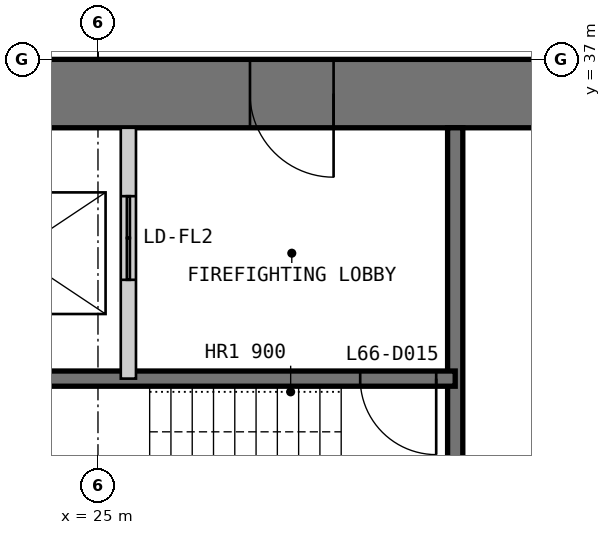
"""IFC4 building model, lengths in metres.
Left out: names, types, materials, properties, quantities, classifications, styles, units other than length and angle.
Written with IfcOpenShell. Run it as: python <this file> out.ifc"""

import sys

from ifc_helpers import new_model, si_unit, direction, frame, frame_2d, origin, place, context, subcontext, project, spatial, polyline, rectangle, outline, extrude, element, fill, save


model = new_model("IFC4")
c1 = context("Model", 3, precision=1e-05, world=origin(), true_north=direction((0.0, 1.0)))
c2 = subcontext(c1, "Body", "Model", "MODEL_VIEW")
j1 = project(units=[si_unit("LENGTHUNIT", "METRE"), si_unit("PLANEANGLEUNIT", "RADIAN")], contexts=[c1])
p1 = place(None, origin())
s1 = spatial("IfcSite", under=j1, at=p1, CompositionType="ELEMENT")
p2 = place(p1, origin())
s2 = spatial("IfcBuilding", under=s1, at=p2, CompositionType="ELEMENT")
p3 = place(p2, frame((0.0, 0.0, 276.4)))
s3 = spatial("IfcBuildingStorey", under=s2, at=p3, CompositionType="ELEMENT", Elevation=276.4)
p4 = place(p3, frame((37.0, 36.55, 0.0), z_axis=(0.0, 0.0, 1.0), x_axis=(-1.0, 0.0, 0.0)))
e1 = element("IfcWall", 1, at=p4, inside=s3, PredefinedType="SHEAR", context=c2, shape_type="SweptSolid", body=[
    extrude(outline(polyline([(0.0, -0.45), (24.0, -0.45), (23.1, 0.45), (0.9, 0.45), (0.0, -0.45)])), origin(), (0.0, 0.0, 1.0), 3.4),
])
p5 = place(p4, frame((4.9, 0.0, 0.0)))
e2 = element("IfcOpeningElement", 2, at=p5, cuts=e1, PredefinedType="OPENING", context=c2, shape_type="SweptSolid", body=[
    extrude(rectangle(XDim=1.0, YDim=2.2, at=frame_2d((0.5, 1.1))), frame((0.0, 0.46, 0.0), z_axis=(0.0, -1.0, 0.0), x_axis=(1.0, 0.0, 0.0)), (0.0, 0.0, 1.0), 0.92),
])
p6 = place(p4, frame((8.9, 0.0, 0.0)))
e3 = element("IfcOpeningElement", 3, at=p6, cuts=e1, PredefinedType="OPENING", context=c2, shape_type="SweptSolid", body=[
    extrude(rectangle(XDim=1.1, YDim=2.2, at=frame_2d((0.55, 1.1))), frame((0.0, 0.46, 0.0), z_axis=(0.0, -1.0, 0.0), x_axis=(1.0, 0.0, 0.0)), (0.0, 0.0, 1.0), 0.92),
])
p7 = place(p4, frame((15.05, 0.0, 0.0)))
e4 = element("IfcOpeningElement", 4, at=p7, cuts=e1, PredefinedType="OPENING", context=c2, shape_type="SweptSolid", body=[
    extrude(rectangle(XDim=0.9, YDim=2.2, at=frame_2d((0.45, 1.1))), frame((0.0, 0.46, 0.0), z_axis=(0.0, -1.0, 0.0), x_axis=(1.0, 0.0, 0.0)), (0.0, 0.0, 1.0), 0.92),
])
p8 = place(p4, frame((17.9, 0.0, 0.0)))
e5 = element("IfcOpeningElement", 5, at=p8, cuts=e1, PredefinedType="OPENING", context=c2, shape_type="SweptSolid", body=[
    extrude(rectangle(XDim=1.0, YDim=2.2, at=frame_2d((0.5, 1.1))), frame((0.0, 0.46, 0.0), z_axis=(0.0, -1.0, 0.0), x_axis=(1.0, 0.0, 0.0)), (0.0, 0.0, 1.0), 0.92),
])
p9 = place(p4, frame((21.4, 0.0, 0.0)))
e6 = element("IfcOpeningElement", 6, at=p9, cuts=e1, PredefinedType="OPENING", context=c2, shape_type="SweptSolid", body=[
    extrude(rectangle(XDim=1.0, YDim=2.2, at=frame_2d((0.5, 1.1))), frame((0.0, 0.46, 0.0), z_axis=(0.0, -1.0, 0.0), x_axis=(1.0, 0.0, 0.0)), (0.0, 0.0, 1.0), 0.92),
])
p10 = place(p3, frame((29.7, 36.1, 0.0), z_axis=(0.0, 0.0, 1.0), x_axis=(0.0, -1.0, 0.0)))
e7 = element("IfcWall", 7, at=p10, inside=s3, PredefinedType="SOLIDWALL", context=c2, shape_type="SweptSolid", body=[
    extrude(rectangle(XDim=16.1, YDim=0.2, at=frame_2d((8.05, 0.0))), origin(), (0.0, 0.0, 1.0), 3.2),
])
p11 = place(p10, frame((6.4, 0.0, 0.0)))
e8 = element("IfcOpeningElement", 8, at=p11, cuts=e7, PredefinedType="OPENING", context=c2, shape_type="SweptSolid", body=[
    extrude(rectangle(XDim=0.9, YDim=2.2, at=frame_2d((0.45, 1.1))), frame((0.0, 0.11, 0.0), z_axis=(0.0, -1.0, 0.0), x_axis=(1.0, 0.0, 0.0)), (0.0, 0.0, 1.0), 0.22),
])
p12 = place(p10, frame((11.4, 0.0, 0.0)))
e9 = element("IfcOpeningElement", 9, at=p12, cuts=e7, PredefinedType="OPENING", context=c2, shape_type="SweptSolid", body=[
    extrude(rectangle(XDim=0.9, YDim=2.2, at=frame_2d((0.45, 1.1))), frame((0.0, 0.11, 0.0), z_axis=(0.0, -1.0, 0.0), x_axis=(1.0, 0.0, 0.0)), (0.0, 0.0, 1.0), 0.22),
])
p13 = place(p3, frame((29.7, 32.8, 0.0), z_axis=(0.0, 0.0, 1.0), x_axis=(-1.0, 0.0, 0.0)))
e10 = element("IfcWall", 10, at=p13, inside=s3, PredefinedType="SOLIDWALL", context=c2, shape_type="SweptSolid", body=[
    extrude(rectangle(XDim=9.4, YDim=0.2, at=frame_2d((4.7, 0.0))), origin(), (0.0, 0.0, 1.0), 3.2),
])
p14 = place(p13, frame((0.25, 0.0, 0.0)))
e11 = element("IfcOpeningElement", 11, at=p14, cuts=e10, PredefinedType="OPENING", context=c2, shape_type="SweptSolid", body=[
    extrude(rectangle(XDim=1.0, YDim=2.2, at=frame_2d((0.5, 1.1))), frame((0.0, 0.11, 0.0), z_axis=(0.0, -1.0, 0.0), x_axis=(1.0, 0.0, 0.0)), (0.0, 0.0, 1.0), 0.22),
])
p15 = place(p3, frame((25.4, 36.1, 0.0), z_axis=(0.0, 0.0, 1.0), x_axis=(0.0, -1.0, 0.0)))
e12 = element("IfcWall", 12, at=p15, inside=s3, PredefinedType="PARTITIONING", context=c2, shape_type="SweptSolid", body=[
    extrude(rectangle(XDim=3.3, YDim=0.2, at=frame_2d((1.65, 0.0))), origin(), (0.0, 0.0, 1.0), 3.2),
])
p16 = place(p15, frame((0.9, 0.0, 0.0)))
e13 = element("IfcOpeningElement", 13, at=p16, cuts=e12, PredefinedType="OPENING", context=c2, shape_type="SweptSolid", body=[
    extrude(rectangle(XDim=1.1, YDim=2.2, at=frame_2d((0.55, 1.1))), frame((0.0, 0.11, 0.0), z_axis=(0.0, -1.0, 0.0), x_axis=(1.0, 0.0, 0.0)), (0.0, 0.0, 1.0), 0.22),
])
p17 = place(p6, origin())
e14 = element("IfcDoor", 14, at=p17, inside=s3, OperationType="SINGLE_SWING_LEFT", PredefinedType="DOOR", context=c2, shape_type="SweptSolid", body=[
    extrude(rectangle(XDim=1.1, YDim=2.2, at=frame_2d((0.55, 1.1))), frame((0.0, 0.025, 0.0), z_axis=(0.0, -1.0, 0.0), x_axis=(1.0, 0.0, 0.0)), (0.0, 0.0, 1.0), 0.05),
    extrude(outline(polyline([(0.0, 0.0), (0.04, 0.0), (0.04, 2.16), (1.06, 2.16), (1.06, 0.0), (1.1, 0.0), (1.1, 2.2), (0.0, 2.2), (0.0, 0.0)])), frame((0.0, 0.3, 0.0), z_axis=(0.0, -1.0, 0.0), x_axis=(1.0, 0.0, 0.0)), (0.0, 0.0, 1.0), 0.6),
])
fill(e3, e14)
p18 = place(p14, origin())
e15 = element("IfcDoor", 15, at=p18, inside=s3, OperationType="SINGLE_SWING_LEFT", PredefinedType="DOOR", context=c2, shape_type="SweptSolid", body=[
    extrude(rectangle(XDim=1.0, YDim=2.2, at=frame_2d((0.5, 1.1))), frame((0.0, 0.025, 0.0), z_axis=(0.0, -1.0, 0.0), x_axis=(1.0, 0.0, 0.0)), (0.0, 0.0, 1.0), 0.05),
])
fill(e11, e15)
p19 = place(p16, origin())
e16 = element("IfcDoor", 16, at=p19, inside=s3, OperationType="DOUBLE_DOOR_SLIDING", PredefinedType="DOOR", context=c2, shape_type="SweptSolid", body=[
    extrude(rectangle(XDim=1.1, YDim=2.2, at=frame_2d((0.55, 1.1))), frame((0.0, 0.025, 0.0), z_axis=(0.0, -1.0, 0.0), x_axis=(1.0, 0.0, 0.0)), (0.0, 0.0, 1.0), 0.05),
])
fill(e13, e16)
save(model, sys.argv[1])
